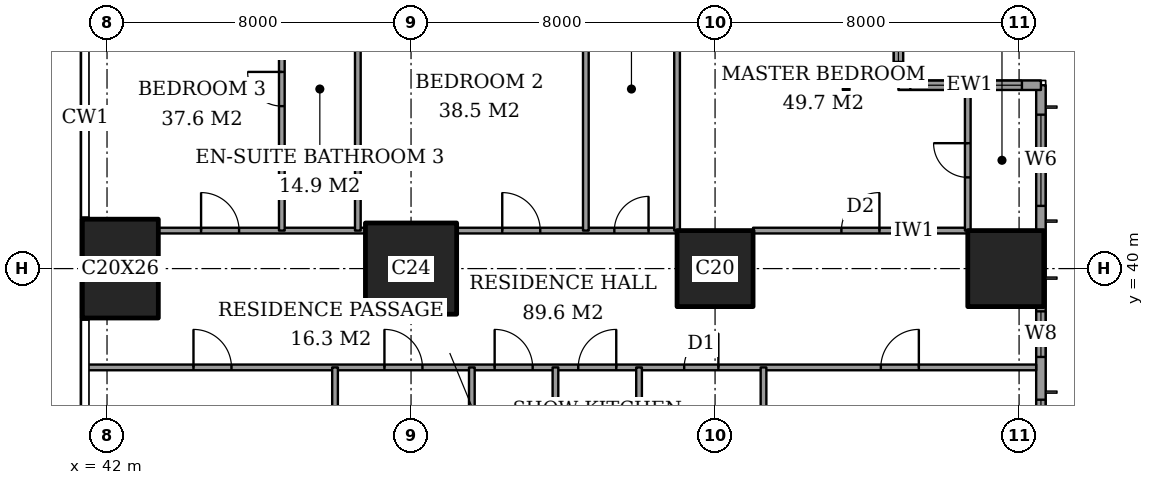
"""IFC4 building model, lengths in metres.
Left out: names, types, materials, properties, quantities, classifications, styles, units other than length and angle.
Written with IfcOpenShell. Run it as: python <this file> out.ifc"""

import sys

from ifc_helpers import new_model, si_unit, direction, frame, frame_2d, origin, origin_2d, place, context, subcontext, project, spatial, rectangle, extrude, element, fill, save


model = new_model("IFC4")
c1 = context("Model", 3, precision=1e-05, world=origin(), true_north=direction((0.0, 1.0)))
c2 = subcontext(c1, "Body", "Model", "MODEL_VIEW")
j1 = project(units=[si_unit("LENGTHUNIT", "METRE"), si_unit("PLANEANGLEUNIT", "RADIAN")], contexts=[c1])
p1 = place(None, origin())
s1 = spatial("IfcSite", under=j1, at=p1, CompositionType="ELEMENT")
p2 = place(p1, origin())
s2 = spatial("IfcBuilding", under=s1, at=p2, CompositionType="ELEMENT")
p3 = place(p2, frame((0.0, 0.0, 83.6)))
s3 = spatial("IfcBuildingStorey", under=s2, at=p3, CompositionType="ELEMENT", Elevation=83.6)
p4 = place(p3, frame((42.35, 40.0, 0.0), z_axis=(0.0, 0.0, 1.0), x_axis=(1.0, 0.0, 0.0)))
e1 = element("IfcColumn", 1, at=p4, inside=s3, PredefinedType="COLUMN", context=c2, shape_type="SweptSolid", body=[
    extrude(rectangle(XDim=2.0, YDim=2.6, at=origin_2d()), origin(), (0.0, 0.0, 1.0), 3.6),
])
p5 = place(p3, frame((50.0, 40.0, 0.0), z_axis=(0.0, 0.0, 1.0), x_axis=(1.0, 0.0, 0.0)))
e2 = element("IfcColumn", 2, at=p5, inside=s3, PredefinedType="COLUMN", context=c2, shape_type="SweptSolid", body=[
    extrude(rectangle(XDim=2.4, YDim=2.4, at=origin_2d()), origin(), (0.0, 0.0, 1.0), 3.6),
])
for number, where, z_axis, x_axis in (
    (3, (58.0, 40.0, 0.0), (0.0, 0.0, 1.0), (1.0, 0.0, 0.0)),
    (4, (65.65, 40.0, 0.0), (0.0, 0.0, 1.0), (1.0, 0.0, 0.0)),
):
    element("IfcColumn", number, at=place(p3, frame(where, z_axis=z_axis, x_axis=x_axis)), inside=s3, PredefinedType="COLUMN", context=c2, shape_type="SweptSolid", body=[
        extrude(rectangle(XDim=2.0, YDim=2.0, at=origin_2d()), origin(), (0.0, 0.0, 1.0), 3.6),
    ])
p6 = place(p3, frame((66.575, 3.175, 0.0), z_axis=(0.0, 0.0, 1.0), x_axis=(0.0, 1.0, 0.0)))
e5 = element("IfcWall", 5, at=p6, inside=s3, PredefinedType="SOLIDWALL", context=c2, shape_type="SweptSolid", body=[
    extrude(rectangle(XDim=41.65, YDim=0.25, at=frame_2d((20.825, 0.0))), origin(), (0.0, 0.0, 1.0), 3.6),
])
p7 = place(p6, frame((0.775, 0.0, 0.6)))
e6 = element("IfcOpeningElement", 6, at=p7, cuts=e5, PredefinedType="OPENING", context=c2, shape_type="SweptSolid", body=[
    extrude(rectangle(XDim=2.4, YDim=2.0, at=frame_2d((1.2, 1.0))), frame((0.0, 0.135, 0.0), z_axis=(0.0, -1.0, 0.0), x_axis=(1.0, 0.0, 0.0)), (0.0, 0.0, 1.0), 0.27),
])
p8 = place(p6, frame((6.1, 0.0, 0.6)))
e7 = element("IfcOpeningElement", 7, at=p8, cuts=e5, PredefinedType="OPENING", context=c2, shape_type="SweptSolid", body=[
    extrude(rectangle(XDim=1.2, YDim=2.0, at=frame_2d((0.6, 1.0))), frame((0.0, 0.135, 0.0), z_axis=(0.0, -1.0, 0.0), x_axis=(1.0, 0.0, 0.0)), (0.0, 0.0, 1.0), 0.27),
])
p9 = place(p6, frame((8.275, 0.0, 0.6)))
e8 = element("IfcOpeningElement", 8, at=p9, cuts=e5, PredefinedType="OPENING", context=c2, shape_type="SweptSolid", body=[
    extrude(rectangle(XDim=2.4, YDim=2.0, at=frame_2d((1.2, 1.0))), frame((0.0, 0.135, 0.0), z_axis=(0.0, -1.0, 0.0), x_axis=(1.0, 0.0, 0.0)), (0.0, 0.0, 1.0), 0.27),
])
p10 = place(p6, frame((15.775, 0.0, 0.6)))
e9 = element("IfcOpeningElement", 9, at=p10, cuts=e5, PredefinedType="OPENING", context=c2, shape_type="SweptSolid", body=[
    extrude(rectangle(XDim=2.4, YDim=2.0, at=frame_2d((1.2, 1.0))), frame((0.0, 0.135, 0.0), z_axis=(0.0, -1.0, 0.0), x_axis=(1.0, 0.0, 0.0)), (0.0, 0.0, 1.0), 0.27),
])
p11 = place(p6, frame((23.475, 0.0, 0.6)))
e10 = element("IfcOpeningElement", 10, at=p11, cuts=e5, PredefinedType="OPENING", context=c2, shape_type="SweptSolid", body=[
    extrude(rectangle(XDim=2.4, YDim=2.0, at=frame_2d((1.2, 1.0))), frame((0.0, 0.135, 0.0), z_axis=(0.0, -1.0, 0.0), x_axis=(1.0, 0.0, 0.0)), (0.0, 0.0, 1.0), 0.27),
])
p12 = place(p6, frame((30.975, 0.0, 0.6)))
e11 = element("IfcOpeningElement", 11, at=p12, cuts=e5, PredefinedType="OPENING", context=c2, shape_type="SweptSolid", body=[
    extrude(rectangle(XDim=2.4, YDim=2.0, at=frame_2d((1.2, 1.0))), frame((0.0, 0.135, 0.0), z_axis=(0.0, -1.0, 0.0), x_axis=(1.0, 0.0, 0.0)), (0.0, 0.0, 1.0), 0.27),
])
p13 = place(p6, frame((34.5, 0.0, 0.6)))
e12 = element("IfcOpeningElement", 12, at=p13, cuts=e5, PredefinedType="OPENING", context=c2, shape_type="SweptSolid", body=[
    extrude(rectangle(XDim=1.2, YDim=2.0, at=frame_2d((0.6, 1.0))), frame((0.0, 0.135, 0.0), z_axis=(0.0, -1.0, 0.0), x_axis=(1.0, 0.0, 0.0)), (0.0, 0.0, 1.0), 0.27),
])
p14 = place(p6, frame((38.475, 0.0, 0.6)))
e13 = element("IfcOpeningElement", 13, at=p14, cuts=e5, PredefinedType="OPENING", context=c2, shape_type="SweptSolid", body=[
    extrude(rectangle(XDim=2.4, YDim=2.0, at=frame_2d((1.2, 1.0))), frame((0.0, 0.135, 0.0), z_axis=(0.0, -1.0, 0.0), x_axis=(1.0, 0.0, 0.0)), (0.0, 0.0, 1.0), 0.27),
])
p15 = place(p3, frame((66.575, 44.825, 0.0), z_axis=(0.0, 0.0, 1.0), x_axis=(-1.0, 0.0, 0.0)))
e14 = element("IfcWall", 14, at=p15, inside=s3, PredefinedType="SOLIDWALL", context=c2, shape_type="SweptSolid", body=[
    extrude(rectangle(XDim=3.75, YDim=0.25, at=frame_2d((1.875, 0.0))), origin(), (0.0, 0.0, 1.0), 3.6),
])
p16 = place(p15, frame((0.5, 0.0, 0.6)))
e15 = element("IfcOpeningElement", 15, at=p16, cuts=e14, PredefinedType="OPENING", context=c2, shape_type="SweptSolid", body=[
    extrude(rectangle(XDim=1.2, YDim=2.0, at=frame_2d((0.6, 1.0))), frame((0.0, 0.135, 0.0), z_axis=(0.0, -1.0, 0.0), x_axis=(1.0, 0.0, 0.0)), (0.0, 0.0, 1.0), 0.27),
])
p17 = place(p15, frame((2.238, 0.0, 0.6)))
e16 = element("IfcOpeningElement", 16, at=p17, cuts=e14, PredefinedType="OPENING", context=c2, shape_type="SweptSolid", body=[
    extrude(rectangle(XDim=1.2, YDim=2.0, at=frame_2d((0.6, 1.0))), frame((0.0, 0.135, 0.0), z_axis=(0.0, -1.0, 0.0), x_axis=(1.0, 0.0, 0.0)), (0.0, 0.0, 1.0), 0.27),
])
p18 = place(p3, frame((62.825, 44.825, 0.0), z_axis=(0.0, 0.0, 1.0), x_axis=(0.0, 1.0, 0.0)))
e17 = element("IfcWall", 17, at=p18, inside=s3, PredefinedType="SOLIDWALL", context=c2, shape_type="SweptSolid", body=[
    extrude(rectangle(XDim=3.75, YDim=0.25, at=frame_2d((1.875, 0.0))), origin(), (0.0, 0.0, 1.0), 3.6),
])
p19 = place(p18, frame((0.613, 0.0, 0.6)))
e18 = element("IfcOpeningElement", 18, at=p19, cuts=e17, PredefinedType="OPENING", context=c2, shape_type="SweptSolid", body=[
    extrude(rectangle(XDim=2.4, YDim=2.0, at=frame_2d((1.2, 1.0))), frame((0.0, 0.135, 0.0), z_axis=(0.0, -1.0, 0.0), x_axis=(1.0, 0.0, 0.0)), (0.0, 0.0, 1.0), 0.27),
])
p20 = place(p3, frame((41.439, 37.4, 0.0), z_axis=(0.0, 0.0, 1.0), x_axis=(1.0, 0.0, 0.0)))
e19 = element("IfcWall", 19, at=p20, inside=s3, PredefinedType="PARTITIONING", context=c2, shape_type="SweptSolid", body=[
    extrude(rectangle(XDim=25.011, YDim=0.15, at=frame_2d((12.505, 0.0))), origin(), (0.0, 0.0, 1.0), 3.35),
])
p21 = place(p20, frame((10.761, 0.0, 0.0)))
e20 = element("IfcOpeningElement", 20, at=p21, cuts=e19, PredefinedType="OPENING", context=c2, shape_type="SweptSolid", body=[
    extrude(rectangle(XDim=1.0, YDim=2.1, at=frame_2d((0.5, 1.05))), frame((0.0, 0.085, 0.0), z_axis=(0.0, -1.0, 0.0), x_axis=(1.0, 0.0, 0.0)), (0.0, 0.0, 1.0), 0.17),
])
p22 = place(p20, frame((20.924, 0.0, 0.0)))
e21 = element("IfcOpeningElement", 21, at=p22, cuts=e19, PredefinedType="OPENING", context=c2, shape_type="SweptSolid", body=[
    extrude(rectangle(XDim=1.0, YDim=2.1, at=frame_2d((0.5, 1.05))), frame((0.0, 0.085, 0.0), z_axis=(0.0, -1.0, 0.0), x_axis=(1.0, 0.0, 0.0)), (0.0, 0.0, 1.0), 0.17),
])
p23 = place(p20, frame((15.749, 0.0, 0.0)))
e22 = element("IfcOpeningElement", 22, at=p23, cuts=e19, PredefinedType="OPENING", context=c2, shape_type="SweptSolid", body=[
    extrude(rectangle(XDim=0.9, YDim=2.1, at=frame_2d((0.45, 1.05))), frame((0.0, 0.085, 0.0), z_axis=(0.0, -1.0, 0.0), x_axis=(1.0, 0.0, 0.0)), (0.0, 0.0, 1.0), 0.17),
])
p24 = place(p20, frame((12.961, 0.0, 0.0)))
e23 = element("IfcOpeningElement", 23, at=p24, cuts=e19, PredefinedType="OPENING", context=c2, shape_type="SweptSolid", body=[
    extrude(rectangle(XDim=1.0, YDim=2.1, at=frame_2d((0.5, 1.05))), frame((0.0, 0.085, 0.0), z_axis=(0.0, -1.0, 0.0), x_axis=(1.0, 0.0, 0.0)), (0.0, 0.0, 1.0), 0.17),
])
p25 = place(p20, frame((7.861, 0.0, 0.0)))
e24 = element("IfcOpeningElement", 24, at=p25, cuts=e19, PredefinedType="OPENING", context=c2, shape_type="SweptSolid", body=[
    extrude(rectangle(XDim=1.0, YDim=2.1, at=frame_2d((0.5, 1.05))), frame((0.0, 0.085, 0.0), z_axis=(0.0, -1.0, 0.0), x_axis=(1.0, 0.0, 0.0)), (0.0, 0.0, 1.0), 0.17),
])
p26 = place(p20, frame((2.836, 0.0, 0.0)))
e25 = element("IfcOpeningElement", 25, at=p26, cuts=e19, PredefinedType="OPENING", context=c2, shape_type="SweptSolid", body=[
    extrude(rectangle(XDim=1.0, YDim=2.1, at=frame_2d((0.5, 1.05))), frame((0.0, 0.085, 0.0), z_axis=(0.0, -1.0, 0.0), x_axis=(1.0, 0.0, 0.0)), (0.0, 0.0, 1.0), 0.17),
])
p27 = place(p3, frame((43.35, 41.0, 0.0), z_axis=(0.0, 0.0, 1.0), x_axis=(1.0, 0.0, 0.0)))
e26 = element("IfcWall", 26, at=p27, inside=s3, PredefinedType="PARTITIONING", context=c2, shape_type="SweptSolid", body=[
    extrude(rectangle(XDim=5.45, YDim=0.15, at=frame_2d((2.725, 0.0))), origin(), (0.0, 0.0, 1.0), 3.35),
])
p28 = place(p27, frame((1.125, 0.0, 0.0)))
e27 = element("IfcOpeningElement", 27, at=p28, cuts=e26, PredefinedType="OPENING", context=c2, shape_type="SweptSolid", body=[
    extrude(rectangle(XDim=1.0, YDim=2.1, at=frame_2d((0.5, 1.05))), frame((0.0, 0.085, 0.0), z_axis=(0.0, -1.0, 0.0), x_axis=(1.0, 0.0, 0.0)), (0.0, 0.0, 1.0), 0.17),
])
p29 = place(p3, frame((51.2, 41.0, 0.0), z_axis=(0.0, 0.0, 1.0), x_axis=(1.0, 0.0, 0.0)))
e28 = element("IfcWall", 28, at=p29, inside=s3, PredefinedType="PARTITIONING", context=c2, shape_type="SweptSolid", body=[
    extrude(rectangle(XDim=5.8, YDim=0.15, at=frame_2d((2.9, 0.0))), origin(), (0.0, 0.0, 1.0), 3.35),
])
p30 = place(p29, frame((4.15, 0.0, 0.0)))
e29 = element("IfcOpeningElement", 29, at=p30, cuts=e28, PredefinedType="OPENING", context=c2, shape_type="SweptSolid", body=[
    extrude(rectangle(XDim=0.9, YDim=2.1, at=frame_2d((0.45, 1.05))), frame((0.0, 0.085, 0.0), z_axis=(0.0, -1.0, 0.0), x_axis=(1.0, 0.0, 0.0)), (0.0, 0.0, 1.0), 0.17),
])
p31 = place(p29, frame((1.2, 0.0, 0.0)))
e30 = element("IfcOpeningElement", 30, at=p31, cuts=e28, PredefinedType="OPENING", context=c2, shape_type="SweptSolid", body=[
    extrude(rectangle(XDim=1.0, YDim=2.1, at=frame_2d((0.5, 1.05))), frame((0.0, 0.085, 0.0), z_axis=(0.0, -1.0, 0.0), x_axis=(1.0, 0.0, 0.0)), (0.0, 0.0, 1.0), 0.17),
])
p32 = place(p3, frame((59.0, 41.0, 0.0), z_axis=(0.0, 0.0, 1.0), x_axis=(1.0, 0.0, 0.0)))
e31 = element("IfcWall", 31, at=p32, inside=s3, PredefinedType="PARTITIONING", context=c2, shape_type="SweptSolid", body=[
    extrude(rectangle(XDim=5.65, YDim=0.15, at=frame_2d((2.825, 0.0))), origin(), (0.0, 0.0, 1.0), 3.35),
])
p33 = place(p32, frame((2.325, 0.0, 0.0)))
e32 = element("IfcOpeningElement", 32, at=p33, cuts=e31, PredefinedType="OPENING", context=c2, shape_type="SweptSolid", body=[
    extrude(rectangle(XDim=1.0, YDim=2.1, at=frame_2d((0.5, 1.05))), frame((0.0, 0.085, 0.0), z_axis=(0.0, -1.0, 0.0), x_axis=(1.0, 0.0, 0.0)), (0.0, 0.0, 1.0), 0.17),
])
p34 = place(p3, frame((46.6, 41.0, 0.0), z_axis=(0.0, 0.0, 1.0), x_axis=(0.0, 1.0, 0.0)))
e33 = element("IfcWall", 33, at=p34, inside=s3, PredefinedType="PARTITIONING", context=c2, shape_type="SweptSolid", body=[
    extrude(rectangle(XDim=7.45, YDim=0.15, at=frame_2d((3.725, 0.0))), origin(), (0.0, 0.0, 1.0), 3.35),
])
p35 = place(p34, frame((3.275, 0.0, 0.0)))
e34 = element("IfcOpeningElement", 34, at=p35, cuts=e33, PredefinedType="OPENING", context=c2, shape_type="SweptSolid", body=[
    extrude(rectangle(XDim=0.9, YDim=2.1, at=frame_2d((0.45, 1.05))), frame((0.0, 0.085, 0.0), z_axis=(0.0, -1.0, 0.0), x_axis=(1.0, 0.0, 0.0)), (0.0, 0.0, 1.0), 0.17),
])
p36 = place(p3, frame((48.0, 28.0, 0.0), z_axis=(0.0, 0.0, 1.0), x_axis=(0.0, 1.0, 0.0)))
e35 = element("IfcWall", 35, at=p36, inside=s3, PredefinedType="PARTITIONING", context=c2, shape_type="SweptSolid", body=[
    extrude(rectangle(XDim=9.4, YDim=0.15, at=frame_2d((4.7, 0.0))), origin(), (0.0, 0.0, 1.0), 3.35),
])
p37 = place(p36, frame((0.55, 0.0, 0.0)))
e36 = element("IfcOpeningElement", 36, at=p37, cuts=e35, PredefinedType="OPENING", context=c2, shape_type="SweptSolid", body=[
    extrude(rectangle(XDim=0.9, YDim=2.1, at=frame_2d((0.45, 1.05))), frame((0.0, 0.085, 0.0), z_axis=(0.0, -1.0, 0.0), x_axis=(1.0, 0.0, 0.0)), (0.0, 0.0, 1.0), 0.17),
])
p38 = place(p3, frame((48.6, 41.0, 0.0), z_axis=(0.0, 0.0, 1.0), x_axis=(0.0, 1.0, 0.0)))
e37 = element("IfcWall", 37, at=p38, inside=s3, PredefinedType="PARTITIONING", context=c2, shape_type="SweptSolid", body=[
    extrude(rectangle(XDim=7.45, YDim=0.15, at=frame_2d((3.725, 0.0))), origin(), (0.0, 0.0, 1.0), 3.35),
])
for number, where, z_axis, x_axis in (
    (38, (51.6, 30.0, 0.0), (0.0, 0.0, 1.0), (0.0, 1.0, 0.0)),
    (39, (53.8, 30.0, 0.0), (0.0, 0.0, 1.0), (0.0, 1.0, 0.0)),
):
    element("IfcWall", number, at=place(p3, frame(where, z_axis=z_axis, x_axis=x_axis)), inside=s3, PredefinedType="PARTITIONING", context=c2, shape_type="SweptSolid", body=[
        extrude(rectangle(XDim=7.4, YDim=0.15, at=frame_2d((3.7, 0.0))), origin(), (0.0, 0.0, 1.0), 3.35),
    ])
p39 = place(p3, frame((54.6, 41.0, 0.0), z_axis=(0.0, 0.0, 1.0), x_axis=(0.0, 1.0, 0.0)))
e40 = element("IfcWall", 40, at=p39, inside=s3, PredefinedType="PARTITIONING", context=c2, shape_type="SweptSolid", body=[
    extrude(rectangle(XDim=7.45, YDim=0.15, at=frame_2d((3.725, 0.0))), origin(), (0.0, 0.0, 1.0), 3.35),
])
p40 = place(p3, frame((56.0, 28.0, 0.0), z_axis=(0.0, 0.0, 1.0), x_axis=(0.0, 1.0, 0.0)))
e41 = element("IfcWall", 41, at=p40, inside=s3, PredefinedType="PARTITIONING", context=c2, shape_type="SweptSolid", body=[
    extrude(rectangle(XDim=9.4, YDim=0.15, at=frame_2d((4.7, 0.0))), origin(), (0.0, 0.0, 1.0), 3.35),
])
p41 = place(p40, frame((0.5, 0.0, 0.0)))
e42 = element("IfcOpeningElement", 42, at=p41, cuts=e41, PredefinedType="OPENING", context=c2, shape_type="SweptSolid", body=[
    extrude(rectangle(XDim=1.0, YDim=2.1, at=frame_2d((0.5, 1.05))), frame((0.0, 0.085, 0.0), z_axis=(0.0, -1.0, 0.0), x_axis=(1.0, 0.0, 0.0)), (0.0, 0.0, 1.0), 0.17),
])
p42 = place(p3, frame((57.0, 41.0, 0.0), z_axis=(0.0, 0.0, 1.0), x_axis=(0.0, 1.0, 0.0)))
e43 = element("IfcWall", 43, at=p42, inside=s3, PredefinedType="PARTITIONING", context=c2, shape_type="SweptSolid", body=[
    extrude(rectangle(XDim=5.65, YDim=0.15, at=frame_2d((2.825, 0.0))), origin(), (0.0, 0.0, 1.0), 3.35),
])
p43 = place(p3, frame((59.275, 33.2, 0.0), z_axis=(0.0, 0.0, 1.0), x_axis=(0.0, 1.0, 0.0)))
e44 = element("IfcWall", 44, at=p43, inside=s3, PredefinedType="PARTITIONING", context=c2, shape_type="SweptSolid", body=[
    extrude(rectangle(XDim=4.2, YDim=0.15, at=frame_2d((2.1, 0.0))), origin(), (0.0, 0.0, 1.0), 3.35),
])
p44 = place(p3, frame((64.65, 41.0, 0.0), z_axis=(0.0, 0.0, 1.0), x_axis=(0.0, 1.0, 0.0)))
e45 = element("IfcWall", 45, at=p44, inside=s3, PredefinedType="PARTITIONING", context=c2, shape_type="SweptSolid", body=[
    extrude(rectangle(XDim=3.7, YDim=0.15, at=frame_2d((1.85, 0.0))), origin(), (0.0, 0.0, 1.0), 3.35),
])
p45 = place(p44, frame((1.4, 0.0, 0.0)))
e46 = element("IfcOpeningElement", 46, at=p45, cuts=e45, PredefinedType="OPENING", context=c2, shape_type="SweptSolid", body=[
    extrude(rectangle(XDim=0.9, YDim=2.1, at=frame_2d((0.45, 1.05))), frame((0.0, 0.085, 0.0), z_axis=(0.0, -1.0, 0.0), x_axis=(1.0, 0.0, 0.0)), (0.0, 0.0, 1.0), 0.17),
])
p46 = place(p12, origin())
e47 = element("IfcWindow", 47, at=p46, inside=s3, PartitioningType="SINGLE_PANEL", PredefinedType="WINDOW", context=c2, shape_type="SweptSolid", body=[
    extrude(rectangle(XDim=2.4, YDim=2.0, at=frame_2d((1.2, 1.0))), frame((0.0, 0.03, 0.0), z_axis=(0.0, -1.0, 0.0), x_axis=(1.0, 0.0, 0.0)), (0.0, 0.0, 1.0), 0.06),
])
fill(e11, e47)
p47 = place(p13, origin())
e48 = element("IfcWindow", 48, at=p47, inside=s3, PartitioningType="SINGLE_PANEL", PredefinedType="WINDOW", context=c2, shape_type="SweptSolid", body=[
    extrude(rectangle(XDim=1.2, YDim=2.0, at=frame_2d((0.6, 1.0))), frame((0.0, 0.03, 0.0), z_axis=(0.0, -1.0, 0.0), x_axis=(1.0, 0.0, 0.0)), (0.0, 0.0, 1.0), 0.06),
])
fill(e12, e48)
p48 = place(p14, origin())
e49 = element("IfcWindow", 49, at=p48, inside=s3, PartitioningType="SINGLE_PANEL", PredefinedType="WINDOW", context=c2, shape_type="SweptSolid", body=[
    extrude(rectangle(XDim=2.4, YDim=2.0, at=frame_2d((1.2, 1.0))), frame((0.0, 0.03, 0.0), z_axis=(0.0, -1.0, 0.0), x_axis=(1.0, 0.0, 0.0)), (0.0, 0.0, 1.0), 0.06),
])
fill(e13, e49)
p49 = place(p16, origin())
e50 = element("IfcWindow", 50, at=p49, inside=s3, PartitioningType="SINGLE_PANEL", PredefinedType="WINDOW", context=c2, shape_type="SweptSolid", body=[
    extrude(rectangle(XDim=1.2, YDim=2.0, at=frame_2d((0.6, 1.0))), frame((0.0, 0.03, 0.0), z_axis=(0.0, -1.0, 0.0), x_axis=(1.0, 0.0, 0.0)), (0.0, 0.0, 1.0), 0.06),
])
fill(e15, e50)
p50 = place(p17, origin())
e51 = element("IfcWindow", 51, at=p50, inside=s3, PartitioningType="SINGLE_PANEL", PredefinedType="WINDOW", context=c2, shape_type="SweptSolid", body=[
    extrude(rectangle(XDim=1.2, YDim=2.0, at=frame_2d((0.6, 1.0))), frame((0.0, 0.03, 0.0), z_axis=(0.0, -1.0, 0.0), x_axis=(1.0, 0.0, 0.0)), (0.0, 0.0, 1.0), 0.06),
])
fill(e16, e51)
p51 = place(p19, origin())
e52 = element("IfcWindow", 52, at=p51, inside=s3, PartitioningType="SINGLE_PANEL", PredefinedType="WINDOW", context=c2, shape_type="SweptSolid", body=[
    extrude(rectangle(XDim=2.4, YDim=2.0, at=frame_2d((1.2, 1.0))), frame((0.0, 0.03, 0.0), z_axis=(0.0, -1.0, 0.0), x_axis=(1.0, 0.0, 0.0)), (0.0, 0.0, 1.0), 0.06),
])
fill(e18, e52)
p52 = place(p45, origin())
e53 = element("IfcDoor", 53, at=p52, inside=s3, OperationType="SINGLE_SWING_LEFT", PredefinedType="DOOR", context=c2, shape_type="SweptSolid", body=[
    extrude(rectangle(XDim=0.9, YDim=2.1, at=frame_2d((0.45, 1.05))), frame((0.0, 0.025, 0.0), z_axis=(0.0, -1.0, 0.0), x_axis=(1.0, 0.0, 0.0)), (0.0, 0.0, 1.0), 0.05),
])
fill(e46, e53)
p53 = place(p33, origin())
e54 = element("IfcDoor", 54, at=p53, inside=s3, OperationType="SINGLE_SWING_LEFT", PredefinedType="DOOR", context=c2, shape_type="SweptSolid", body=[
    extrude(rectangle(XDim=1.0, YDim=2.1, at=frame_2d((0.5, 1.05))), frame((0.0, 0.025, 0.0), z_axis=(0.0, -1.0, 0.0), x_axis=(1.0, 0.0, 0.0)), (0.0, 0.0, 1.0), 0.05),
])
fill(e32, e54)
p54 = place(p30, origin())
e55 = element("IfcDoor", 55, at=p54, inside=s3, OperationType="SINGLE_SWING_LEFT", PredefinedType="DOOR", context=c2, shape_type="SweptSolid", body=[
    extrude(rectangle(XDim=0.9, YDim=2.1, at=frame_2d((0.45, 1.05))), frame((0.0, 0.025, 0.0), z_axis=(0.0, -1.0, 0.0), x_axis=(1.0, 0.0, 0.0)), (0.0, 0.0, 1.0), 0.05),
])
fill(e29, e55)
p55 = place(p31, origin())
e56 = element("IfcDoor", 56, at=p55, inside=s3, OperationType="SINGLE_SWING_RIGHT", PredefinedType="DOOR", context=c2, shape_type="SweptSolid", body=[
    extrude(rectangle(XDim=1.0, YDim=2.1, at=frame_2d((0.5, 1.05))), frame((0.0, 0.025, 0.0), z_axis=(0.0, -1.0, 0.0), x_axis=(1.0, 0.0, 0.0)), (0.0, 0.0, 1.0), 0.05),
])
fill(e30, e56)
p56 = place(p35, origin())
e57 = element("IfcDoor", 57, at=p56, inside=s3, OperationType="SINGLE_SWING_LEFT", PredefinedType="DOOR", context=c2, shape_type="SweptSolid", body=[
    extrude(rectangle(XDim=0.9, YDim=2.1, at=frame_2d((0.45, 1.05))), frame((0.0, 0.025, 0.0), z_axis=(0.0, -1.0, 0.0), x_axis=(1.0, 0.0, 0.0)), (0.0, 0.0, 1.0), 0.05),
])
fill(e34, e57)
p57 = place(p28, origin())
e58 = element("IfcDoor", 58, at=p57, inside=s3, OperationType="SINGLE_SWING_RIGHT", PredefinedType="DOOR", context=c2, shape_type="SweptSolid", body=[
    extrude(rectangle(XDim=1.0, YDim=2.1, at=frame_2d((0.5, 1.05))), frame((0.0, 0.025, 0.0), z_axis=(0.0, -1.0, 0.0), x_axis=(1.0, 0.0, 0.0)), (0.0, 0.0, 1.0), 0.05),
])
fill(e27, e58)
p58 = place(p21, origin())
e59 = element("IfcDoor", 59, at=p58, inside=s3, OperationType="SINGLE_SWING_RIGHT", PredefinedType="DOOR", context=c2, shape_type="SweptSolid", body=[
    extrude(rectangle(XDim=1.0, YDim=2.1, at=frame_2d((0.5, 1.05))), frame((0.0, 0.025, 0.0), z_axis=(0.0, -1.0, 0.0), x_axis=(1.0, 0.0, 0.0)), (0.0, 0.0, 1.0), 0.05),
])
fill(e20, e59)
p59 = place(p22, origin())
e60 = element("IfcDoor", 60, at=p59, inside=s3, OperationType="SINGLE_SWING_LEFT", PredefinedType="DOOR", context=c2, shape_type="SweptSolid", body=[
    extrude(rectangle(XDim=1.0, YDim=2.1, at=frame_2d((0.5, 1.05))), frame((0.0, 0.025, 0.0), z_axis=(0.0, -1.0, 0.0), x_axis=(1.0, 0.0, 0.0)), (0.0, 0.0, 1.0), 0.05),
])
fill(e21, e60)
p60 = place(p23, origin())
e61 = element("IfcDoor", 61, at=p60, inside=s3, OperationType="SINGLE_SWING_LEFT", PredefinedType="DOOR", context=c2, shape_type="SweptSolid", body=[
    extrude(rectangle(XDim=0.9, YDim=2.1, at=frame_2d((0.45, 1.05))), frame((0.0, 0.025, 0.0), z_axis=(0.0, -1.0, 0.0), x_axis=(1.0, 0.0, 0.0)), (0.0, 0.0, 1.0), 0.05),
])
fill(e22, e61)
p61 = place(p24, origin())
e62 = element("IfcDoor", 62, at=p61, inside=s3, OperationType="SINGLE_SWING_LEFT", PredefinedType="DOOR", context=c2, shape_type="SweptSolid", body=[
    extrude(rectangle(XDim=1.0, YDim=2.1, at=frame_2d((0.5, 1.05))), frame((0.0, 0.025, 0.0), z_axis=(0.0, -1.0, 0.0), x_axis=(1.0, 0.0, 0.0)), (0.0, 0.0, 1.0), 0.05),
])
fill(e23, e62)
p62 = place(p25, origin())
e63 = element("IfcDoor", 63, at=p62, inside=s3, OperationType="SINGLE_SWING_RIGHT", PredefinedType="DOOR", context=c2, shape_type="SweptSolid", body=[
    extrude(rectangle(XDim=1.0, YDim=2.1, at=frame_2d((0.5, 1.05))), frame((0.0, 0.025, 0.0), z_axis=(0.0, -1.0, 0.0), x_axis=(1.0, 0.0, 0.0)), (0.0, 0.0, 1.0), 0.05),
])
fill(e24, e63)
p63 = place(p26, origin())
e64 = element("IfcDoor", 64, at=p63, inside=s3, OperationType="SINGLE_SWING_RIGHT", PredefinedType="DOOR", context=c2, shape_type="SweptSolid", body=[
    extrude(rectangle(XDim=1.0, YDim=2.1, at=frame_2d((0.5, 1.05))), frame((0.0, 0.025, 0.0), z_axis=(0.0, -1.0, 0.0), x_axis=(1.0, 0.0, 0.0)), (0.0, 0.0, 1.0), 0.05),
])
fill(e25, e64)
save(model, sys.argv[1])
